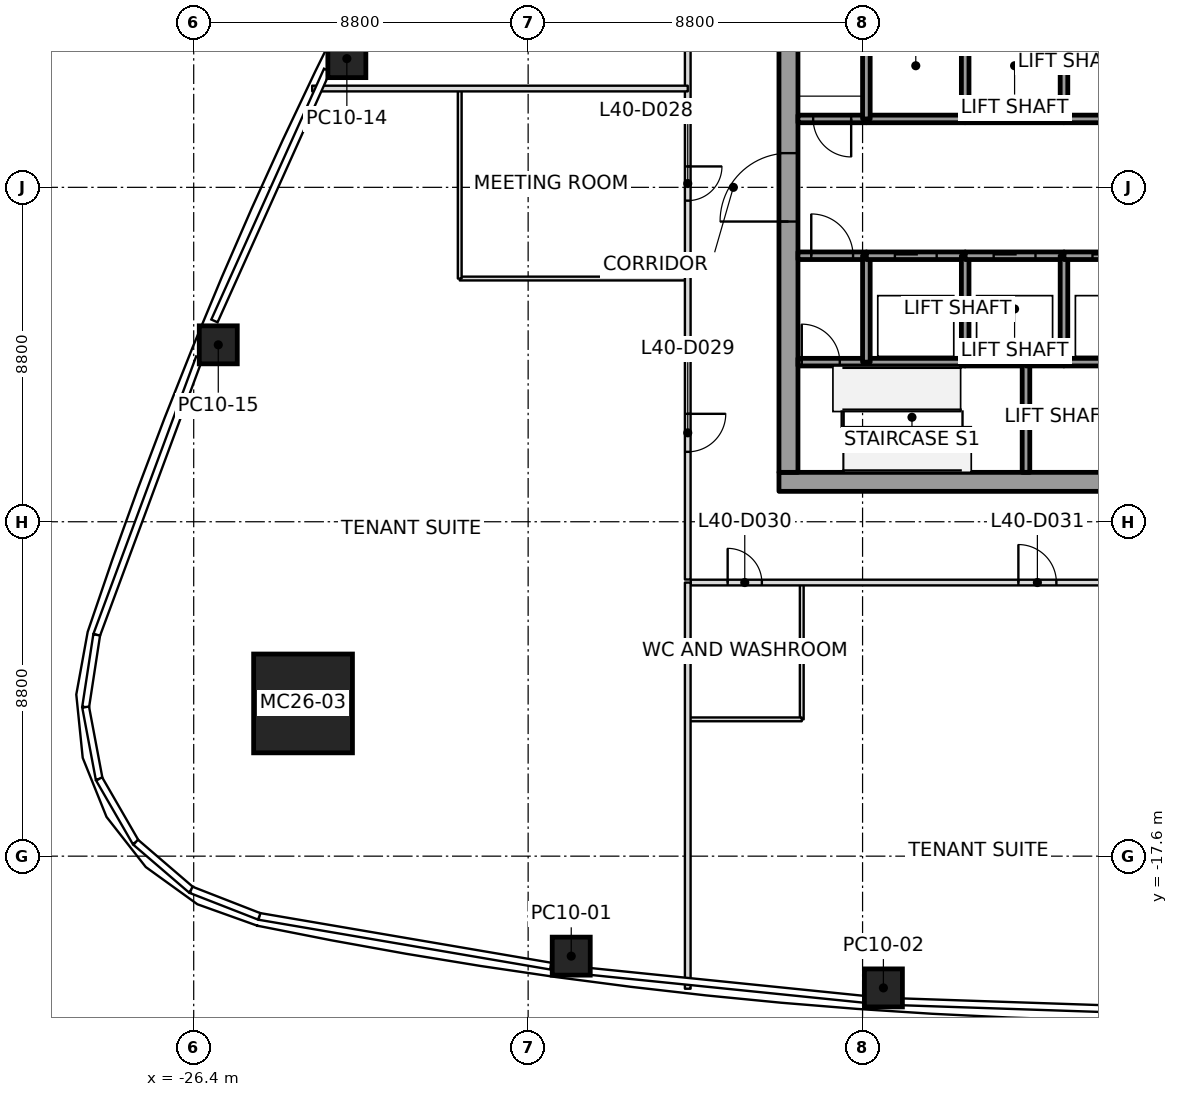
"""IFC4 building model, lengths in metres.
Left out: names, types, materials, properties, quantities, classifications, styles, units other than length and angle.
Written with IfcOpenShell. Run it as: python <this file> out.ifc"""

import sys

from ifc_helpers import new_model, si_unit, direction, frame, frame_2d, origin, origin_2d, place, context, subcontext, project, spatial, rectangle, extrude, element, fill, save


model = new_model("IFC4")
c1 = context("Model", 3, precision=1e-05, world=origin(), true_north=direction((0.0, 1.0)))
c2 = subcontext(c1, "Body", "Model", "MODEL_VIEW")
j1 = project(units=[si_unit("LENGTHUNIT", "METRE"), si_unit("PLANEANGLEUNIT", "RADIAN")], contexts=[c1])
p1 = place(None, origin())
s1 = spatial("IfcSite", under=j1, at=p1, CompositionType="ELEMENT")
p2 = place(p1, origin())
s2 = spatial("IfcBuilding", under=s1, at=p2, CompositionType="ELEMENT")
p3 = place(p2, frame((0.0, 0.0, 181.8)))
s3 = spatial("IfcBuildingStorey", under=s2, at=p3, CompositionType="ELEMENT", Elevation=181.8)
p4 = place(p3, frame((-23.523, -13.581, 0.0), z_axis=(0.028000489904, 0.016165860184, 0.999477182096), x_axis=(0.999607909415, -0.000452829555, -0.027996828039)))
e1 = element("IfcColumn", 1, at=p4, inside=s3, PredefinedType="COLUMN", context=c2, shape_type="SweptSolid", body=[
    extrude(rectangle(XDim=2.6, YDim=2.6, at=origin_2d()), origin(), (0.0, 0.0, 1.0), 4.002),
])
p5 = place(p3, frame((-16.466, -20.231, 0.0), z_axis=(0.017574453011, 0.010434831475, 0.999791104628), x_axis=(-0.990722511159, 0.134954425998, 0.016006523216)))
e2 = element("IfcColumn", 2, at=p5, inside=s3, PredefinedType="COLUMN", context=c2, shape_type="SweptSolid", body=[
    extrude(rectangle(XDim=1.0, YDim=1.0, at=origin_2d()), origin(), (0.0, 0.0, 1.0), 4.001),
])
for number, where, z_axis, x_axis in (
    (3, (-8.252, -21.067, 0.0), (0.009, 0.011, 1.0), (-0.998, 0.068, 0.008)),
    (4, (-22.37, 3.387, 0.0), (0.014, 0.002, 1.0), (0.44, 0.898, -0.008)),
):
    element("IfcColumn", number, at=place(p3, frame(where, z_axis=z_axis, x_axis=x_axis)), inside=s3, PredefinedType="COLUMN", context=c2, shape_type="SweptSolid", body=[
        extrude(rectangle(XDim=1.0, YDim=1.0, at=origin_2d()), origin(), (0.0, 0.0, 1.0), 4.0),
    ])
p6 = place(p3, frame((-25.753, -4.144, 0.0), z_axis=(0.017818543466, 0.010007675097, 0.999791151165), x_axis=(0.378654720825, 0.925399499523, -0.016011517114)))
e5 = element("IfcColumn", 5, at=p6, inside=s3, PredefinedType="COLUMN", context=c2, shape_type="SweptSolid", body=[
    extrude(rectangle(XDim=1.0, YDim=1.0, at=origin_2d()), origin(), (0.0, 0.0, 1.0), 4.001),
])
p7 = place(p3, frame((-11.0, -7.75, 0.0), z_axis=(0.0, 0.0, 1.0), x_axis=(1.0, 0.0, 0.0)))
e6 = element("IfcWall", 6, at=p7, inside=s3, PredefinedType="SHEAR", context=c2, shape_type="SweptSolid", body=[
    extrude(rectangle(XDim=22.0, YDim=0.5, at=frame_2d((11.0, 0.0))), origin(), (0.0, 0.0, 1.0), 4.0),
])
p8 = place(p7, frame((10.45, 0.0, 0.0)))
e7 = element("IfcOpeningElement", 7, at=p8, cuts=e6, PredefinedType="OPENING", context=c2, shape_type="SweptSolid", body=[
    extrude(rectangle(XDim=1.1, YDim=2.1, at=frame_2d((0.55, 1.05))), frame((0.0, 0.25, 0.0), z_axis=(0.0, -1.0, 0.0), x_axis=(1.0, 0.0, 0.0)), (0.0, 0.0, 1.0), 0.5),
])
p9 = place(p3, frame((-10.75, -7.5, 0.0), z_axis=(0.0, 0.0, 1.0), x_axis=(0.0, 1.0, 0.0)))
e8 = element("IfcWall", 8, at=p9, inside=s3, PredefinedType="SHEAR", context=c2, shape_type="SweptSolid", body=[
    extrude(rectangle(XDim=15.0, YDim=0.5, at=frame_2d((7.5, 0.0))), origin(), (0.0, 0.0, 1.0), 4.0),
])
p10 = place(p9, frame((6.6, 0.0, 0.0)))
e9 = element("IfcOpeningElement", 9, at=p10, cuts=e8, PredefinedType="OPENING", context=c2, shape_type="SweptSolid", body=[
    extrude(rectangle(XDim=1.8, YDim=2.1, at=frame_2d((0.9, 1.05))), frame((0.0, 0.25, 0.0), z_axis=(0.0, -1.0, 0.0), x_axis=(1.0, 0.0, 0.0)), (0.0, 0.0, 1.0), 0.5),
])
p11 = place(p3, frame((-10.5, -4.6, 0.0), z_axis=(0.0, 0.0, 1.0), x_axis=(1.0, 0.0, 0.0)))
e10 = element("IfcWall", 10, at=p11, inside=s3, PredefinedType="SOLIDWALL", context=c2, shape_type="SweptSolid", body=[
    extrude(rectangle(XDim=1.8, YDim=0.2, at=frame_2d((0.9, 0.0))), origin(), (0.0, 0.0, 1.0), 3.85),
])
p12 = place(p11, frame((0.1, 0.0, 0.0)))
e11 = element("IfcOpeningElement", 11, at=p12, cuts=e10, PredefinedType="OPENING", context=c2, shape_type="SweptSolid", body=[
    extrude(rectangle(XDim=1.0, YDim=2.1, at=frame_2d((0.5, 1.05))), frame((0.0, 0.1, 0.0), z_axis=(0.0, -1.0, 0.0), x_axis=(1.0, 0.0, 0.0)), (0.0, 0.0, 1.0), 0.2),
])
p13 = place(p3, frame((-10.5, -1.8, 0.0), z_axis=(0.0, 0.0, 1.0), x_axis=(1.0, 0.0, 0.0)))
e12 = element("IfcWall", 12, at=p13, inside=s3, PredefinedType="SOLIDWALL", context=c2, shape_type="SweptSolid", body=[
    extrude(rectangle(XDim=1.8, YDim=0.2, at=frame_2d((0.9, 0.0))), origin(), (0.0, 0.0, 1.0), 3.85),
])
p14 = place(p13, frame((0.35, 0.0, 0.0)))
e13 = element("IfcOpeningElement", 13, at=p14, cuts=e12, PredefinedType="OPENING", context=c2, shape_type="SweptSolid", body=[
    extrude(rectangle(XDim=1.1, YDim=2.1, at=frame_2d((0.55, 1.05))), frame((0.0, 0.1, 0.0), z_axis=(0.0, -1.0, 0.0), x_axis=(1.0, 0.0, 0.0)), (0.0, 0.0, 1.0), 0.2),
])
p15 = place(p3, frame((-8.7, 1.8, 0.0), z_axis=(0.0, 0.0, 1.0), x_axis=(-1.0, 0.0, 0.0)))
e14 = element("IfcWall", 14, at=p15, inside=s3, PredefinedType="SOLIDWALL", context=c2, shape_type="SweptSolid", body=[
    extrude(rectangle(XDim=1.8, YDim=0.2, at=frame_2d((0.9, 0.0))), origin(), (0.0, 0.0, 1.0), 3.85),
])
p16 = place(p15, frame((0.4, 0.0, 0.0)))
e15 = element("IfcOpeningElement", 15, at=p16, cuts=e14, PredefinedType="OPENING", context=c2, shape_type="SweptSolid", body=[
    extrude(rectangle(XDim=1.0, YDim=2.1, at=frame_2d((0.5, 1.05))), frame((0.0, 0.1, 0.0), z_axis=(0.0, -1.0, 0.0), x_axis=(1.0, 0.0, 0.0)), (0.0, 0.0, 1.0), 0.2),
])
p17 = place(p3, frame((-8.7, -4.6, 0.0), z_axis=(0.0, 0.0, 1.0), x_axis=(1.0, 0.0, 0.0)))
e16 = element("IfcWall", 16, at=p17, inside=s3, PredefinedType="SOLIDWALL", context=c2, shape_type="SweptSolid", body=[
    extrude(rectangle(XDim=2.6, YDim=0.2, at=frame_2d((1.3, 0.0))), origin(), (0.0, 0.0, 1.0), 3.85),
])
p18 = place(p3, frame((-8.7, -4.6, 0.0), z_axis=(0.0, 0.0, 1.0), x_axis=(0.0, 1.0, 0.0)))
e17 = element("IfcWall", 17, at=p18, inside=s3, PredefinedType="SOLIDWALL", context=c2, shape_type="SweptSolid", body=[
    extrude(rectangle(XDim=2.8, YDim=0.2, at=frame_2d((1.4, 0.0))), origin(), (0.0, 0.0, 1.0), 3.85),
])
p19 = place(p3, frame((-8.7, -1.8, 0.0), z_axis=(0.0, 0.0, 1.0), x_axis=(1.0, 0.0, 0.0)))
e18 = element("IfcWall", 18, at=p19, inside=s3, PredefinedType="SOLIDWALL", context=c2, shape_type="SweptSolid", body=[
    extrude(rectangle(XDim=2.6, YDim=0.2, at=frame_2d((1.3, 0.0))), origin(), (0.0, 0.0, 1.0), 3.85),
])
p20 = place(p19, frame((0.75, 0.0, 0.0)))
e19 = element("IfcOpeningElement", 19, at=p20, cuts=e18, PredefinedType="OPENING", context=c2, shape_type="SweptSolid", body=[
    extrude(rectangle(XDim=1.1, YDim=2.1, at=frame_2d((0.55, 1.05))), frame((0.0, 0.1, 0.0), z_axis=(0.0, -1.0, 0.0), x_axis=(1.0, 0.0, 0.0)), (0.0, 0.0, 1.0), 0.2),
])
p21 = place(p3, frame((-6.1, 1.8, 0.0), z_axis=(0.0, 0.0, 1.0), x_axis=(-1.0, 0.0, 0.0)))
e20 = element("IfcWall", 20, at=p21, inside=s3, PredefinedType="SOLIDWALL", context=c2, shape_type="SweptSolid", body=[
    extrude(rectangle(XDim=2.6, YDim=0.2, at=frame_2d((1.3, 0.0))), origin(), (0.0, 0.0, 1.0), 3.85),
])
p22 = place(p3, frame((-8.7, 1.8, 0.0), z_axis=(0.0, 0.0, 1.0), x_axis=(0.0, 1.0, 0.0)))
e21 = element("IfcWall", 21, at=p22, inside=s3, PredefinedType="SOLIDWALL", context=c2, shape_type="SweptSolid", body=[
    extrude(rectangle(XDim=2.8, YDim=0.2, at=frame_2d((1.4, 0.0))), origin(), (0.0, 0.0, 1.0), 3.85),
])
p23 = place(p3, frame((-6.1, -4.6, 0.0), z_axis=(0.0, 0.0, 1.0), x_axis=(1.0, 0.0, 0.0)))
e22 = element("IfcWall", 22, at=p23, inside=s3, PredefinedType="SOLIDWALL", context=c2, shape_type="SweptSolid", body=[
    extrude(rectangle(XDim=1.6, YDim=0.2, at=frame_2d((0.8, 0.0))), origin(), (0.0, 0.0, 1.0), 3.85),
])
p24 = place(p3, frame((-6.1, -4.6, 0.0), z_axis=(0.0, 0.0, 1.0), x_axis=(0.0, 1.0, 0.0)))
e23 = element("IfcWall", 23, at=p24, inside=s3, PredefinedType="SOLIDWALL", context=c2, shape_type="SweptSolid", body=[
    extrude(rectangle(XDim=2.8, YDim=0.2, at=frame_2d((1.4, 0.0))), origin(), (0.0, 0.0, 1.0), 3.85),
])
p25 = place(p3, frame((-6.1, -1.8, 0.0), z_axis=(0.0, 0.0, 1.0), x_axis=(1.0, 0.0, 0.0)))
e24 = element("IfcWall", 24, at=p25, inside=s3, PredefinedType="SOLIDWALL", context=c2, shape_type="SweptSolid", body=[
    extrude(rectangle(XDim=2.6, YDim=0.2, at=frame_2d((1.3, 0.0))), origin(), (0.0, 0.0, 1.0), 3.85),
])
p26 = place(p25, frame((0.75, 0.0, 0.0)))
e25 = element("IfcOpeningElement", 25, at=p26, cuts=e24, PredefinedType="OPENING", context=c2, shape_type="SweptSolid", body=[
    extrude(rectangle(XDim=1.1, YDim=2.1, at=frame_2d((0.55, 1.05))), frame((0.0, 0.1, 0.0), z_axis=(0.0, -1.0, 0.0), x_axis=(1.0, 0.0, 0.0)), (0.0, 0.0, 1.0), 0.2),
])
p27 = place(p3, frame((-3.5, 1.8, 0.0), z_axis=(0.0, 0.0, 1.0), x_axis=(-1.0, 0.0, 0.0)))
e26 = element("IfcWall", 26, at=p27, inside=s3, PredefinedType="SOLIDWALL", context=c2, shape_type="SweptSolid", body=[
    extrude(rectangle(XDim=2.6, YDim=0.2, at=frame_2d((1.3, 0.0))), origin(), (0.0, 0.0, 1.0), 3.85),
])
p28 = place(p3, frame((-6.1, 1.8, 0.0), z_axis=(0.0, 0.0, 1.0), x_axis=(0.0, 1.0, 0.0)))
e27 = element("IfcWall", 27, at=p28, inside=s3, PredefinedType="SOLIDWALL", context=c2, shape_type="SweptSolid", body=[
    extrude(rectangle(XDim=2.8, YDim=0.2, at=frame_2d((1.4, 0.0))), origin(), (0.0, 0.0, 1.0), 3.85),
])
p29 = place(p3, frame((-4.5, -4.6, 0.0), z_axis=(0.0, 0.0, 1.0), x_axis=(0.0, -1.0, 0.0)))
e28 = element("IfcWall", 28, at=p29, inside=s3, PredefinedType="SOLIDWALL", context=c2, shape_type="SweptSolid", body=[
    extrude(rectangle(XDim=2.9, YDim=0.2, at=frame_2d((1.45, 0.0))), origin(), (0.0, 0.0, 1.0), 3.85),
])
p30 = place(p3, frame((-4.5, -4.6, 0.0), z_axis=(0.0, 0.0, 1.0), x_axis=(1.0, 0.0, 0.0)))
e29 = element("IfcWall", 29, at=p30, inside=s3, PredefinedType="SOLIDWALL", context=c2, shape_type="SweptSolid", body=[
    extrude(rectangle(XDim=1.0, YDim=0.2, at=frame_2d((0.5, 0.0))), origin(), (0.0, 0.0, 1.0), 3.85),
])
p31 = place(p3, frame((-3.5, -4.6, 0.0), z_axis=(0.0, 0.0, 1.0), x_axis=(1.0, 0.0, 0.0)))
e30 = element("IfcWall", 30, at=p31, inside=s3, PredefinedType="SOLIDWALL", context=c2, shape_type="SweptSolid", body=[
    extrude(rectangle(XDim=1.9, YDim=0.2, at=frame_2d((0.95, 0.0))), origin(), (0.0, 0.0, 1.0), 3.85),
])
p32 = place(p3, frame((-3.5, -4.6, 0.0), z_axis=(0.0, 0.0, 1.0), x_axis=(0.0, 1.0, 0.0)))
e31 = element("IfcWall", 31, at=p32, inside=s3, PredefinedType="SOLIDWALL", context=c2, shape_type="SweptSolid", body=[
    extrude(rectangle(XDim=2.8, YDim=0.2, at=frame_2d((1.4, 0.0))), origin(), (0.0, 0.0, 1.0), 3.85),
])
p33 = place(p3, frame((-3.5, -1.8, 0.0), z_axis=(0.0, 0.0, 1.0), x_axis=(1.0, 0.0, 0.0)))
e32 = element("IfcWall", 32, at=p33, inside=s3, PredefinedType="SOLIDWALL", context=c2, shape_type="SweptSolid", body=[
    extrude(rectangle(XDim=2.6, YDim=0.2, at=frame_2d((1.3, 0.0))), origin(), (0.0, 0.0, 1.0), 3.85),
])
p34 = place(p33, frame((0.75, 0.0, 0.0)))
e33 = element("IfcOpeningElement", 33, at=p34, cuts=e32, PredefinedType="OPENING", context=c2, shape_type="SweptSolid", body=[
    extrude(rectangle(XDim=1.1, YDim=2.1, at=frame_2d((0.55, 1.05))), frame((0.0, 0.1, 0.0), z_axis=(0.0, -1.0, 0.0), x_axis=(1.0, 0.0, 0.0)), (0.0, 0.0, 1.0), 0.2),
])
p35 = place(p3, frame((-0.9, 1.8, 0.0), z_axis=(0.0, 0.0, 1.0), x_axis=(-1.0, 0.0, 0.0)))
e34 = element("IfcWall", 34, at=p35, inside=s3, PredefinedType="SOLIDWALL", context=c2, shape_type="SweptSolid", body=[
    extrude(rectangle(XDim=2.6, YDim=0.2, at=frame_2d((1.3, 0.0))), origin(), (0.0, 0.0, 1.0), 3.85),
])
p36 = place(p3, frame((-3.5, 4.6, 0.0), z_axis=(0.0, 0.0, 1.0), x_axis=(0.0, -1.0, 0.0)))
e35 = element("IfcWall", 35, at=p36, inside=s3, PredefinedType="SOLIDWALL", context=c2, shape_type="SweptSolid", body=[
    extrude(rectangle(XDim=2.8, YDim=0.2, at=frame_2d((1.4, 0.0))), origin(), (0.0, 0.0, 1.0), 3.85),
])
p37 = place(p3, frame((-13.4, 2.6, 0.0), z_axis=(0.0, 0.0, 1.0), x_axis=(-1.0, 0.0, 0.0)))
e36 = element("IfcWall", 36, at=p37, inside=s3, PredefinedType="PARTITIONING", context=c2, shape_type="SweptSolid", body=[
    extrude(rectangle(XDim=9.882, YDim=0.15, at=frame_2d((4.941, 0.0))), origin(), (0.0, 0.0, 1.0), 3.234),
])
p38 = place(p3, frame((-13.4, -10.4, 0.0), z_axis=(0.0, 0.0, 1.0), x_axis=(0.0, -1.0, 0.0)))
e37 = element("IfcWall", 37, at=p38, inside=s3, PredefinedType="PARTITIONING", context=c2, shape_type="SweptSolid", body=[
    extrude(rectangle(XDim=10.688, YDim=0.15, at=frame_2d((5.344, 0.0))), origin(), (0.0, 0.0, 1.0), 3.234),
])
p39 = place(p3, frame((-13.4, 10.32, 0.0), z_axis=(0.0, 0.0, 1.0), x_axis=(0.0, -1.0, 0.0)))
e38 = element("IfcWall", 38, at=p39, inside=s3, PredefinedType="PARTITIONING", context=c2, shape_type="SweptSolid", body=[
    extrude(rectangle(XDim=20.64, YDim=0.15, at=frame_2d((10.32, 0.0))), origin(), (0.0, 0.0, 1.0), 3.166),
])
p40 = place(p39, frame((3.32, 0.0, 0.0)))
e39 = element("IfcOpeningElement", 39, at=p40, cuts=e38, PredefinedType="OPENING", context=c2, shape_type="SweptSolid", body=[
    extrude(rectangle(XDim=1.0, YDim=2.1, at=frame_2d((0.5, 1.05))), frame((0.0, 0.075, 0.0), z_axis=(0.0, -1.0, 0.0), x_axis=(1.0, 0.0, 0.0)), (0.0, 0.0, 1.0), 0.15),
])
p41 = place(p39, frame((9.77, 0.0, 0.0)))
e40 = element("IfcOpeningElement", 40, at=p41, cuts=e38, PredefinedType="OPENING", context=c2, shape_type="SweptSolid", body=[
    extrude(rectangle(XDim=0.9, YDim=2.1, at=frame_2d((0.45, 1.05))), frame((0.0, 0.075, 0.0), z_axis=(0.0, -1.0, 0.0), x_axis=(1.0, 0.0, 0.0)), (0.0, 0.0, 1.0), 0.15),
])
p42 = place(p39, frame((16.28, 0.0, 0.0)))
e41 = element("IfcOpeningElement", 41, at=p42, cuts=e38, PredefinedType="OPENING", context=c2, shape_type="SweptSolid", body=[
    extrude(rectangle(XDim=1.0, YDim=2.1, at=frame_2d((0.5, 1.05))), frame((0.0, 0.075, 0.0), z_axis=(0.0, -1.0, 0.0), x_axis=(1.0, 0.0, 0.0)), (0.0, 0.0, 1.0), 0.15),
])
p43 = place(p3, frame((-13.32, -10.4, 0.0), z_axis=(0.0, 0.0, 1.0), x_axis=(1.0, 0.0, 0.0)))
e42 = element("IfcWall", 42, at=p43, inside=s3, PredefinedType="PARTITIONING", context=c2, shape_type="SweptSolid", body=[
    extrude(rectangle(XDim=26.64, YDim=0.15, at=frame_2d((13.32, 0.0))), origin(), (0.0, 0.0, 1.0), 3.317),
])
p44 = place(p43, frame((0.97, 0.0, 0.0)))
e43 = element("IfcOpeningElement", 43, at=p44, cuts=e42, PredefinedType="OPENING", context=c2, shape_type="SweptSolid", body=[
    extrude(rectangle(XDim=0.9, YDim=2.1, at=frame_2d((0.45, 1.05))), frame((0.0, 0.075, 0.0), z_axis=(0.0, -1.0, 0.0), x_axis=(1.0, 0.0, 0.0)), (0.0, 0.0, 1.0), 0.15),
])
p45 = place(p43, frame((8.62, 0.0, 0.0)))
e44 = element("IfcOpeningElement", 44, at=p45, cuts=e42, PredefinedType="OPENING", context=c2, shape_type="SweptSolid", body=[
    extrude(rectangle(XDim=1.0, YDim=2.1, at=frame_2d((0.5, 1.05))), frame((0.0, 0.075, 0.0), z_axis=(0.0, -1.0, 0.0), x_axis=(1.0, 0.0, 0.0)), (0.0, 0.0, 1.0), 0.15),
])
p46 = place(p43, frame((16.27, 0.0, 0.0)))
e45 = element("IfcOpeningElement", 45, at=p46, cuts=e42, PredefinedType="OPENING", context=c2, shape_type="SweptSolid", body=[
    extrude(rectangle(XDim=0.9, YDim=2.1, at=frame_2d((0.45, 1.05))), frame((0.0, 0.075, 0.0), z_axis=(0.0, -1.0, 0.0), x_axis=(1.0, 0.0, 0.0)), (0.0, 0.0, 1.0), 0.15),
])
p47 = place(p43, frame((22.02, 0.0, 0.0)))
e46 = element("IfcOpeningElement", 46, at=p47, cuts=e42, PredefinedType="OPENING", context=c2, shape_type="SweptSolid", body=[
    extrude(rectangle(XDim=1.0, YDim=2.1, at=frame_2d((0.5, 1.05))), frame((0.0, 0.075, 0.0), z_axis=(0.0, -1.0, 0.0), x_axis=(1.0, 0.0, 0.0)), (0.0, 0.0, 1.0), 0.15),
])
p48 = place(p3, frame((-13.43, -2.4, 0.0), z_axis=(0.0, 0.0, 1.0), x_axis=(-1.0, 0.0, 0.0)))
e47 = element("IfcWall", 47, at=p48, inside=s3, PredefinedType="PARTITIONING", context=c2, shape_type="SweptSolid", body=[
    extrude(rectangle(XDim=5.97, YDim=0.1, at=frame_2d((2.985, 0.0))), origin(), (0.0, 0.0, 1.0), 3.317),
])
p49 = place(p3, frame((-19.4, -2.4, 0.0), z_axis=(0.0, 0.0, 1.0), x_axis=(0.0, 1.0, 0.0)))
e48 = element("IfcWall", 48, at=p49, inside=s3, PredefinedType="PARTITIONING", context=c2, shape_type="SweptSolid", body=[
    extrude(rectangle(XDim=4.97, YDim=0.1, at=frame_2d((2.485, 0.0))), origin(), (0.0, 0.0, 1.0), 3.317),
])
p50 = place(p3, frame((-10.4, -10.43, 0.0), z_axis=(0.0, 0.0, 1.0), x_axis=(0.0, -1.0, 0.0)))
e49 = element("IfcWall", 49, at=p50, inside=s3, PredefinedType="PARTITIONING", context=c2, shape_type="SweptSolid", body=[
    extrude(rectangle(XDim=3.57, YDim=0.1, at=frame_2d((1.785, 0.0))), origin(), (0.0, 0.0, 1.0), 3.45),
])
p51 = place(p3, frame((-10.4, -14.0, 0.0), z_axis=(0.0, 0.0, 1.0), x_axis=(-1.0, 0.0, 0.0)))
e50 = element("IfcWall", 50, at=p51, inside=s3, PredefinedType="PARTITIONING", context=c2, shape_type="SweptSolid", body=[
    extrude(rectangle(XDim=2.97, YDim=0.1, at=frame_2d((1.485, 0.0))), origin(), (0.0, 0.0, 1.0), 3.393),
])
p52 = place(p41, origin())
e51 = element("IfcDoor", 51, at=p52, inside=s3, OperationType="SINGLE_SWING_RIGHT", PredefinedType="DOOR", context=c2, shape_type="SweptSolid", body=[
    extrude(rectangle(XDim=0.9, YDim=2.1, at=frame_2d((0.45, 1.05))), frame((0.0, 0.025, 0.0), z_axis=(0.0, -1.0, 0.0), x_axis=(1.0, 0.0, 0.0)), (0.0, 0.0, 1.0), 0.05),
])
fill(e40, e51)
p53 = place(p42, origin())
e52 = element("IfcDoor", 52, at=p53, inside=s3, OperationType="SINGLE_SWING_RIGHT", PredefinedType="DOOR", context=c2, shape_type="SweptSolid", body=[
    extrude(rectangle(XDim=1.0, YDim=2.1, at=frame_2d((0.5, 1.05))), frame((0.0, 0.025, 0.0), z_axis=(0.0, -1.0, 0.0), x_axis=(1.0, 0.0, 0.0)), (0.0, 0.0, 1.0), 0.05),
])
fill(e41, e52)
p54 = place(p44, origin())
e53 = element("IfcDoor", 53, at=p54, inside=s3, OperationType="SINGLE_SWING_LEFT", PredefinedType="DOOR", context=c2, shape_type="SweptSolid", body=[
    extrude(rectangle(XDim=0.9, YDim=2.1, at=frame_2d((0.45, 1.05))), frame((0.0, 0.025, 0.0), z_axis=(0.0, -1.0, 0.0), x_axis=(1.0, 0.0, 0.0)), (0.0, 0.0, 1.0), 0.05),
])
fill(e43, e53)
p55 = place(p45, origin())
e54 = element("IfcDoor", 54, at=p55, inside=s3, OperationType="SINGLE_SWING_LEFT", PredefinedType="DOOR", context=c2, shape_type="SweptSolid", body=[
    extrude(rectangle(XDim=1.0, YDim=2.1, at=frame_2d((0.5, 1.05))), frame((0.0, 0.025, 0.0), z_axis=(0.0, -1.0, 0.0), x_axis=(1.0, 0.0, 0.0)), (0.0, 0.0, 1.0), 0.05),
])
fill(e44, e54)
p56 = place(p20, origin())
e55 = element("IfcDoor", 55, at=p56, inside=s3, OperationType="SLIDING_TO_LEFT", PredefinedType="DOOR", context=c2, shape_type="SweptSolid", body=[
    extrude(rectangle(XDim=1.1, YDim=2.1, at=frame_2d((0.55, 1.05))), frame((0.0, 0.025, 0.0), z_axis=(0.0, -1.0, 0.0), x_axis=(1.0, 0.0, 0.0)), (0.0, 0.0, 1.0), 0.05),
])
fill(e19, e55)
p57 = place(p26, origin())
e56 = element("IfcDoor", 56, at=p57, inside=s3, OperationType="SLIDING_TO_LEFT", PredefinedType="DOOR", context=c2, shape_type="SweptSolid", body=[
    extrude(rectangle(XDim=1.1, YDim=2.1, at=frame_2d((0.55, 1.05))), frame((0.0, 0.025, 0.0), z_axis=(0.0, -1.0, 0.0), x_axis=(1.0, 0.0, 0.0)), (0.0, 0.0, 1.0), 0.05),
])
fill(e25, e56)
p58 = place(p34, origin())
e57 = element("IfcDoor", 57, at=p58, inside=s3, OperationType="SLIDING_TO_RIGHT", PredefinedType="DOOR", context=c2, shape_type="SweptSolid", body=[
    extrude(rectangle(XDim=1.1, YDim=2.1, at=frame_2d((0.55, 1.05))), frame((0.0, 0.025, 0.0), z_axis=(0.0, -1.0, 0.0), x_axis=(1.0, 0.0, 0.0)), (0.0, 0.0, 1.0), 0.05),
])
fill(e33, e57)
p59 = place(p14, origin())
e58 = element("IfcDoor", 58, at=p59, inside=s3, OperationType="SINGLE_SWING_LEFT", PredefinedType="DOOR", context=c2, shape_type="SweptSolid", body=[
    extrude(rectangle(XDim=1.1, YDim=2.1, at=frame_2d((0.55, 1.05))), frame((0.0, 0.025, 0.0), z_axis=(0.0, -1.0, 0.0), x_axis=(1.0, 0.0, 0.0)), (0.0, 0.0, 1.0), 0.05),
])
fill(e13, e58)
p60 = place(p16, origin())
e59 = element("IfcDoor", 59, at=p60, inside=s3, OperationType="SINGLE_SWING_RIGHT", PredefinedType="DOOR", context=c2, shape_type="SweptSolid", body=[
    extrude(rectangle(XDim=1.0, YDim=2.1, at=frame_2d((0.5, 1.05))), frame((0.0, 0.025, 0.0), z_axis=(0.0, -1.0, 0.0), x_axis=(1.0, 0.0, 0.0)), (0.0, 0.0, 1.0), 0.05),
])
fill(e15, e59)
p61 = place(p12, origin())
e60 = element("IfcDoor", 60, at=p61, inside=s3, OperationType="SINGLE_SWING_LEFT", PredefinedType="DOOR", context=c2, shape_type="SweptSolid", body=[
    extrude(rectangle(XDim=1.0, YDim=2.1, at=frame_2d((0.5, 1.05))), frame((0.0, 0.025, 0.0), z_axis=(0.0, -1.0, 0.0), x_axis=(1.0, 0.0, 0.0)), (0.0, 0.0, 1.0), 0.05),
])
fill(e11, e60)
p62 = place(p10, origin())
e61 = element("IfcDoor", 61, at=p62, inside=s3, OperationType="DOUBLE_DOOR_SINGLE_SWING", PredefinedType="DOOR", context=c2, shape_type="SweptSolid", body=[
    extrude(rectangle(XDim=1.8, YDim=2.1, at=frame_2d((0.9, 1.05))), frame((0.0, 0.025, 0.0), z_axis=(0.0, -1.0, 0.0), x_axis=(1.0, 0.0, 0.0)), (0.0, 0.0, 1.0), 0.05),
])
fill(e9, e61)
save(model, sys.argv[1])
